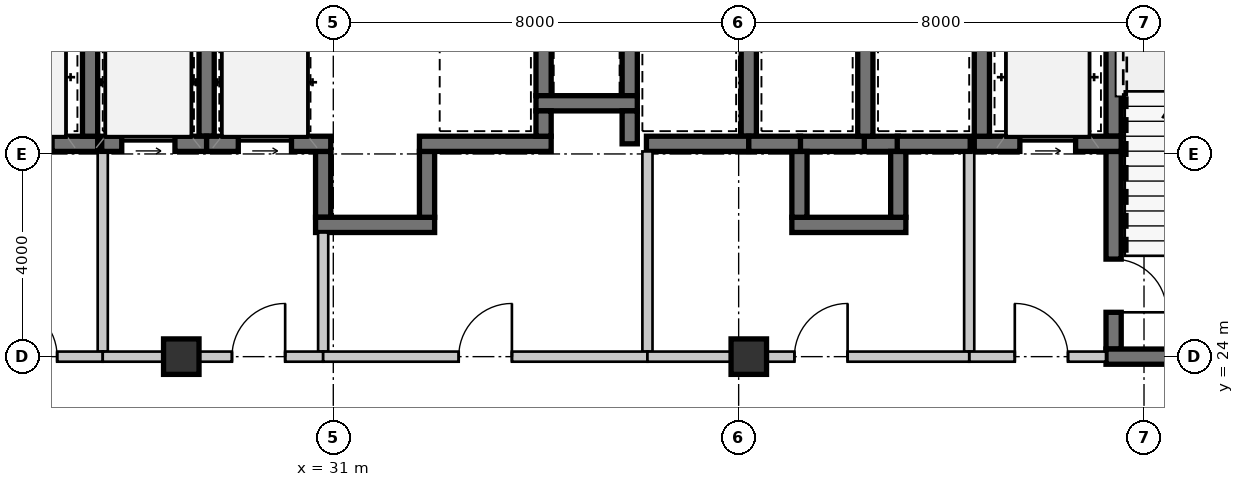
"""IFC4 building model, lengths in metres.
Left out: names, types, materials, properties, quantities, classifications, styles, units other than length and angle.
Written with IfcOpenShell. Run it as: python <this file> out.ifc"""

import sys

from ifc_helpers import new_model, si_unit, direction, frame, frame_2d, origin, origin_2d, place, context, subcontext, project, spatial, rectangle, extrude, source, transform, mapped, element, fill, save


model = new_model("IFC4")
c1 = context("Model", 3, precision=1e-05, world=origin(), true_north=direction((0.0, 1.0)))
c2 = subcontext(c1, "Body", "Model", "MODEL_VIEW")
j1 = project(units=[si_unit("LENGTHUNIT", "METRE"), si_unit("PLANEANGLEUNIT", "RADIAN")], contexts=[c1])
p1 = place(None, origin())
s1 = spatial("IfcSite", under=j1, at=p1, CompositionType="ELEMENT")
p2 = place(p1, origin())
s2 = spatial("IfcBuilding", under=s1, at=p2, CompositionType="ELEMENT")
p3 = place(p2, frame((0.0, 0.0, 106.05)))
s3 = spatial("IfcBuildingStorey", under=s2, at=p3, CompositionType="ELEMENT", Elevation=106.05)
m1 = source(origin(), c2, "Body", "SweptSolid", [
    extrude(rectangle(XDim=0.7, YDim=0.7, at=origin_2d()), origin(), (0.0, 0.0, 1.0), 3.15),
])
for number, where, z_axis, x_axis in (
    (1, (28.0, 24.0, 0.0), (0.0, 0.0, 1.0), (1.0, 0.0, 0.0)),
    (2, (39.2, 24.0, 0.0), (0.0, 0.0, 1.0), (1.0, 0.0, 0.0)),
):
    element("IfcColumn", number, at=place(p3, frame(where, z_axis=z_axis, x_axis=x_axis)), inside=s3, PredefinedType="COLUMN", context=c2, shape_type="MappedRepresentation", body=[
        mapped(m1, transform((0.0, 0.0, 0.0), scale=1.0)),
    ])
m2 = source(origin(), c2, "Body", "SweptSolid", [
    extrude(rectangle(XDim=2.9, YDim=0.3, at=frame_2d((1.45, 0.0))), origin(), (0.0, 0.0, 1.0), 2.93),
])
p4 = place(p3, frame((23.45, 28.2, 0.0), z_axis=(0.0, 0.0, 1.0), x_axis=(1.0, 0.0, 0.0)))
e3 = element("IfcWall", 3, at=p4, inside=s3, PredefinedType="SHEAR", context=c2, shape_type="MappedRepresentation", body=[
    mapped(m2, transform((0.0, 0.0, 0.0), scale=1.0)),
])
m3 = source(origin(), c2, "Body", "SweptSolid", [
    extrude(rectangle(XDim=1.1, YDim=2.15, at=frame_2d((0.55, 1.075))), frame((0.0, 0.16, 0.0), z_axis=(0.0, -1.0, 0.0), x_axis=(1.0, 0.0, 0.0)), (0.0, 0.0, 1.0), 0.32),
])
p5 = place(p4, frame((0.9, 0.0, 0.0)))
e4 = element("IfcOpeningElement", 4, at=p5, cuts=e3, PredefinedType="OPENING", context=c2, shape_type="MappedRepresentation", body=[
    mapped(m3, transform((0.0, 0.0, 0.0), scale=1.0)),
])
m4 = source(origin(), c2, "Body", "SweptSolid", [
    extrude(rectangle(XDim=3.5, YDim=0.3, at=frame_2d((1.75, 0.0))), origin(), (0.0, 0.0, 1.0), 2.93),
])
p6 = place(p3, frame((26.2, 28.35, 0.0), z_axis=(0.0, 0.0, 1.0), x_axis=(0.0, 1.0, 0.0)))
e5 = element("IfcWall", 5, at=p6, inside=s3, PredefinedType="SHEAR", context=c2, shape_type="MappedRepresentation", body=[
    mapped(m4, transform((0.0, 0.0, 0.0), scale=1.0)),
])
m5 = source(origin(), c2, "Body", "SweptSolid", [
    extrude(rectangle(XDim=3.95, YDim=0.2, at=frame_2d((1.975, 0.0))), origin(), (0.0, 0.0, 1.0), 2.93),
])
p7 = place(p3, frame((26.45, 24.1, 0.0), z_axis=(0.0, 0.0, 1.0), x_axis=(0.0, 1.0, 0.0)))
e6 = element("IfcWall", 6, at=p7, inside=s3, PredefinedType="SOLIDWALL", context=c2, shape_type="MappedRepresentation", body=[
    mapped(m5, transform((0.0, 0.0, 0.0), scale=1.0)),
])
m6 = source(origin(), c2, "Body", "SweptSolid", [
    extrude(rectangle(XDim=2.7, YDim=0.2, at=frame_2d((1.35, 0.0))), origin(), (0.0, 0.0, 1.0), 2.47),
])
p8 = place(p3, frame((23.75, 24.0, 0.0), z_axis=(0.0, 0.0, 1.0), x_axis=(1.0, 0.0, 0.0)))
e7 = element("IfcWall", 7, at=p8, inside=s3, PredefinedType="SOLIDWALL", context=c2, shape_type="MappedRepresentation", body=[
    mapped(m6, transform((0.0, 0.0, 0.0), scale=1.0)),
])
m7 = source(origin(), c2, "Body", "SweptSolid", [
    extrude(rectangle(XDim=1.05, YDim=2.1, at=frame_2d((0.525, 1.05))), frame((0.0, 0.11, 0.0), z_axis=(0.0, -1.0, 0.0), x_axis=(1.0, 0.0, 0.0)), (0.0, 0.0, 1.0), 0.22),
])
p9 = place(p8, frame((0.75, 0.0, 0.0)))
e8 = element("IfcOpeningElement", 8, at=p9, cuts=e7, PredefinedType="OPENING", context=c2, shape_type="MappedRepresentation", body=[
    mapped(m7, transform((0.0, 0.0, 0.0), scale=1.0)),
])
p10 = place(p3, frame((46.4, 31.85, 0.0), z_axis=(0.0, 0.0, 1.0), x_axis=(0.0, -1.0, 0.0)))
e9 = element("IfcWall", 9, at=p10, inside=s3, PredefinedType="SHEAR", context=c2, shape_type="MappedRepresentation", body=[
    mapped(m4, transform((0.0, 0.0, 0.0), scale=1.0)),
])
m8 = source(origin(), c2, "Body", "SweptSolid", [
    extrude(rectangle(XDim=3.9, YDim=0.3, at=frame_2d((1.95, 0.0))), origin(), (0.0, 0.0, 1.0), 2.93),
])
p11 = place(p3, frame((46.4, 28.05, 0.0), z_axis=(0.0, 0.0, 1.0), x_axis=(0.0, -1.0, 0.0)))
e10 = element("IfcWall", 10, at=p11, inside=s3, PredefinedType="SHEAR", context=c2, shape_type="MappedRepresentation", body=[
    mapped(m8, transform((0.0, 0.0, 0.0), scale=1.0)),
])
m9 = source(origin(), c2, "Body", "SweptSolid", [
    extrude(rectangle(XDim=1.05, YDim=2.1, at=frame_2d((0.525, 1.05))), frame((0.0, 0.16, 0.0), z_axis=(0.0, -1.0, 0.0), x_axis=(1.0, 0.0, 0.0)), (0.0, 0.0, 1.0), 0.32),
])
p12 = place(p11, frame((2.125, 0.0, 0.0)))
e11 = element("IfcOpeningElement", 11, at=p12, cuts=e10, PredefinedType="OPENING", context=c2, shape_type="MappedRepresentation", body=[
    mapped(m9, transform((0.0, 0.0, 0.0), scale=1.0)),
])
m10 = source(origin(), c2, "Body", "SweptSolid", [
    extrude(rectangle(XDim=4.9, YDim=0.3, at=frame_2d((2.45, 0.0))), origin(), (0.0, 0.0, 1.0), 2.93),
])
p13 = place(p3, frame((46.25, 24.0, 0.0), z_axis=(0.0, 0.0, 1.0), x_axis=(1.0, 0.0, 0.0)))
e12 = element("IfcWall", 12, at=p13, inside=s3, PredefinedType="SHEAR", context=c2, shape_type="MappedRepresentation", body=[
    mapped(m10, transform((0.0, 0.0, 0.0), scale=1.0)),
])
p14 = place(p3, frame((43.65, 28.2, 0.0), z_axis=(0.0, 0.0, 1.0), x_axis=(1.0, 0.0, 0.0)))
e13 = element("IfcWall", 13, at=p14, inside=s3, PredefinedType="SHEAR", context=c2, shape_type="MappedRepresentation", body=[
    mapped(m2, transform((0.0, 0.0, 0.0), scale=1.0)),
])
p15 = place(p14, frame((0.9, 0.0, 0.0)))
e14 = element("IfcOpeningElement", 14, at=p15, cuts=e13, PredefinedType="OPENING", context=c2, shape_type="MappedRepresentation", body=[
    mapped(m3, transform((0.0, 0.0, 0.0), scale=1.0)),
])
p16 = place(p3, frame((43.8, 31.85, 0.0), z_axis=(0.0, 0.0, 1.0), x_axis=(0.0, -1.0, 0.0)))
e15 = element("IfcWall", 15, at=p16, inside=s3, PredefinedType="SHEAR", context=c2, shape_type="MappedRepresentation", body=[
    mapped(m4, transform((0.0, 0.0, 0.0), scale=1.0)),
])
p17 = place(p3, frame((43.55, 28.05, 0.0), z_axis=(0.0, 0.0, 1.0), x_axis=(0.0, -1.0, 0.0)))
e16 = element("IfcWall", 16, at=p17, inside=s3, PredefinedType="SOLIDWALL", context=c2, shape_type="MappedRepresentation", body=[
    mapped(m5, transform((0.0, 0.0, 0.0), scale=1.0)),
])
m11 = source(origin(), c2, "Body", "SweptSolid", [
    extrude(rectangle(XDim=2.7, YDim=0.2, at=frame_2d((1.35, 0.0))), origin(), (0.0, 0.0, 1.0), 2.397),
])
p18 = place(p3, frame((43.55, 24.0, 0.0), z_axis=(0.0, 0.0, 1.0), x_axis=(1.0, 0.0, 0.0)))
e17 = element("IfcWall", 17, at=p18, inside=s3, PredefinedType="SOLIDWALL", context=c2, shape_type="MappedRepresentation", body=[
    mapped(m11, transform((0.0, 0.0, 0.0), scale=1.0)),
])
p19 = place(p18, frame((0.9, 0.0, 0.0)))
e18 = element("IfcOpeningElement", 18, at=p19, cuts=e17, PredefinedType="OPENING", context=c2, shape_type="MappedRepresentation", body=[
    mapped(m7, transform((0.0, 0.0, 0.0), scale=1.0)),
])
m12 = source(origin(), c2, "Body", "SweptSolid", [
    extrude(rectangle(XDim=1.2, YDim=0.3, at=frame_2d((0.6, 0.0))), origin(), (0.0, 0.0, 1.0), 2.93),
])
for number, where, z_axis, x_axis in (
    (19, (35.15, 30.35, 0.0), (0.0, 0.0, 1.0), (0.0, -1.0, 0.0)),
    (20, (36.85, 29.15, 0.0), (0.0, 0.0, 1.0), (0.0, 1.0, 0.0)),
):
    element("IfcWall", number, at=place(p3, frame(where, z_axis=z_axis, x_axis=x_axis)), inside=s3, PredefinedType="SHEAR", context=c2, shape_type="MappedRepresentation", body=[
        mapped(m12, transform((0.0, 0.0, 0.0), scale=1.0)),
    ])
m13 = source(origin(), c2, "Body", "SweptSolid", [
    extrude(rectangle(XDim=2.0, YDim=0.3, at=frame_2d((1.0, 0.0))), origin(), (0.0, 0.0, 1.0), 2.93),
])
p20 = place(p3, frame((35.0, 29.0, 0.0), z_axis=(0.0, 0.0, 1.0), x_axis=(1.0, 0.0, 0.0)))
e21 = element("IfcWall", 21, at=p20, inside=s3, PredefinedType="SHEAR", context=c2, shape_type="MappedRepresentation", body=[
    mapped(m13, transform((0.0, 0.0, 0.0), scale=1.0)),
])
m14 = source(origin(), c2, "Body", "SweptSolid", [
    extrude(rectangle(XDim=1.3, YDim=0.3, at=frame_2d((0.65, 0.0))), origin(), (0.0, 0.0, 1.0), 2.93),
])
p21 = place(p3, frame((30.8, 28.05, 0.0), z_axis=(0.0, 0.0, 1.0), x_axis=(0.0, -1.0, 0.0)))
e22 = element("IfcWall", 22, at=p21, inside=s3, PredefinedType="SHEAR", context=c2, shape_type="MappedRepresentation", body=[
    mapped(m14, transform((0.0, 0.0, 0.0), scale=1.0)),
])
m15 = source(origin(), c2, "Body", "SweptSolid", [
    extrude(rectangle(XDim=2.35, YDim=0.3, at=frame_2d((1.175, 0.0))), origin(), (0.0, 0.0, 1.0), 2.93),
])
p22 = place(p3, frame((30.65, 26.6, 0.0), z_axis=(0.0, 0.0, 1.0), x_axis=(1.0, 0.0, 0.0)))
e23 = element("IfcWall", 23, at=p22, inside=s3, PredefinedType="SHEAR", context=c2, shape_type="MappedRepresentation", body=[
    mapped(m15, transform((0.0, 0.0, 0.0), scale=1.0)),
])
p23 = place(p3, frame((32.85, 26.75, 0.0), z_axis=(0.0, 0.0, 1.0), x_axis=(0.0, 1.0, 0.0)))
e24 = element("IfcWall", 24, at=p23, inside=s3, PredefinedType="SHEAR", context=c2, shape_type="MappedRepresentation", body=[
    mapped(m14, transform((0.0, 0.0, 0.0), scale=1.0)),
])
m16 = source(origin(), c2, "Body", "SweptSolid", [
    extrude(rectangle(XDim=1.32, YDim=0.3, at=frame_2d((0.66, 0.0))), origin(), (0.0, 0.0, 1.0), 2.93),
])
p24 = place(p3, frame((41.52, 28.2, 0.0), z_axis=(0.0, 0.0, 1.0), x_axis=(-1.0, 0.0, 0.0)))
e25 = element("IfcWall", 25, at=p24, inside=s3, PredefinedType="SHEAR", context=c2, shape_type="MappedRepresentation", body=[
    mapped(m16, transform((0.0, 0.0, 0.0), scale=1.0)),
])
m17 = source(origin(), c2, "Body", "SweptSolid", [
    extrude(rectangle(XDim=0.67, YDim=0.3, at=frame_2d((0.335, 0.0))), origin(), (0.0, 0.0, 1.0), 2.93),
])
p25 = place(p3, frame((42.15, 28.2, 0.0), z_axis=(0.0, 0.0, 1.0), x_axis=(-1.0, 0.0, 0.0)))
e26 = element("IfcWall", 26, at=p25, inside=s3, PredefinedType="SHEAR", context=c2, shape_type="MappedRepresentation", body=[
    mapped(m17, transform((0.0, 0.0, 0.0), scale=1.0)),
])
m18 = source(origin(), c2, "Body", "SweptSolid", [
    extrude(rectangle(XDim=2.25, YDim=0.3, at=frame_2d((1.125, 0.0))), origin(), (0.0, 0.0, 1.0), 2.93),
])
p26 = place(p3, frame((40.05, 26.6, 0.0), z_axis=(0.0, 0.0, 1.0), x_axis=(1.0, 0.0, 0.0)))
e27 = element("IfcWall", 27, at=p26, inside=s3, PredefinedType="SHEAR", context=c2, shape_type="MappedRepresentation", body=[
    mapped(m18, transform((0.0, 0.0, 0.0), scale=1.0)),
])
for number, where, z_axis, x_axis in (
    (28, (40.2, 28.05, 0.0), (0.0, 0.0, 1.0), (0.0, -1.0, 0.0)),
    (29, (42.15, 26.75, 0.0), (0.0, 0.0, 1.0), (0.0, 1.0, 0.0)),
):
    element("IfcWall", number, at=place(p3, frame(where, z_axis=z_axis, x_axis=x_axis)), inside=s3, PredefinedType="SHEAR", context=c2, shape_type="MappedRepresentation", body=[
        mapped(m14, transform((0.0, 0.0, 0.0), scale=1.0)),
    ])
p27 = place(p3, frame((28.5, 28.35, 0.0), z_axis=(0.0, 0.0, 1.0), x_axis=(0.0, 1.0, 0.0)))
e30 = element("IfcWall", 30, at=p27, inside=s3, PredefinedType="SHEAR", context=c2, shape_type="MappedRepresentation", body=[
    mapped(m4, transform((0.0, 0.0, 0.0), scale=1.0)),
])
m19 = source(origin(), c2, "Body", "SweptSolid", [
    extrude(rectangle(XDim=2.07, YDim=0.3, at=frame_2d((1.035, 0.0))), origin(), (0.0, 0.0, 1.0), 2.93),
])
p28 = place(p3, frame((26.43, 28.2, 0.0), z_axis=(0.0, 0.0, 1.0), x_axis=(1.0, 0.0, 0.0)))
e31 = element("IfcWall", 31, at=p28, inside=s3, PredefinedType="SHEAR", context=c2, shape_type="MappedRepresentation", body=[
    mapped(m19, transform((0.0, 0.0, 0.0), scale=1.0)),
])
m20 = source(origin(), c2, "Body", "SweptSolid", [
    extrude(rectangle(XDim=1.05, YDim=2.15, at=frame_2d((0.525, 1.075))), frame((0.0, 0.16, 0.0), z_axis=(0.0, -1.0, 0.0), x_axis=(1.0, 0.0, 0.0)), (0.0, 0.0, 1.0), 0.32),
])
p29 = place(p28, frame((0.395, 0.0, 0.0)))
e32 = element("IfcOpeningElement", 32, at=p29, cuts=e31, PredefinedType="OPENING", context=c2, shape_type="MappedRepresentation", body=[
    mapped(m20, transform((0.0, 0.0, 0.0), scale=1.0)),
])
m21 = source(origin(), c2, "Body", "SweptSolid", [
    extrude(rectangle(XDim=2.45, YDim=0.3, at=frame_2d((1.225, 0.0))), origin(), (0.0, 0.0, 1.0), 2.93),
])
p30 = place(p3, frame((28.5, 28.2, 0.0), z_axis=(0.0, 0.0, 1.0), x_axis=(1.0, 0.0, 0.0)))
e33 = element("IfcWall", 33, at=p30, inside=s3, PredefinedType="SHEAR", context=c2, shape_type="MappedRepresentation", body=[
    mapped(m21, transform((0.0, 0.0, 0.0), scale=1.0)),
])
p31 = place(p30, frame((0.625, 0.0, 0.0)))
e34 = element("IfcOpeningElement", 34, at=p31, cuts=e33, PredefinedType="OPENING", context=c2, shape_type="MappedRepresentation", body=[
    mapped(m20, transform((0.0, 0.0, 0.0), scale=1.0)),
])
m22 = source(origin(), c2, "Body", "SweptSolid", [
    extrude(rectangle(XDim=2.35, YDim=0.2, at=frame_2d((1.175, 0.0))), origin(), (0.0, 0.0, 1.0), 2.93),
])
p32 = place(p3, frame((30.8, 26.45, 0.0), z_axis=(0.0, 0.0, 1.0), x_axis=(0.0, -1.0, 0.0)))
e35 = element("IfcWall", 35, at=p32, inside=s3, PredefinedType="SOLIDWALL", context=c2, shape_type="MappedRepresentation", body=[
    mapped(m22, transform((0.0, 0.0, 0.0), scale=1.0)),
])
m23 = source(origin(), c2, "Body", "SweptSolid", [
    extrude(rectangle(XDim=4.35, YDim=0.2, at=frame_2d((2.175, 0.0))), origin(), (0.0, 0.0, 1.0), 2.47),
])
p33 = place(p3, frame((30.8, 24.0, 0.0), z_axis=(0.0, 0.0, 1.0), x_axis=(-1.0, 0.0, 0.0)))
e36 = element("IfcWall", 36, at=p33, inside=s3, PredefinedType="SOLIDWALL", context=c2, shape_type="MappedRepresentation", body=[
    mapped(m23, transform((0.0, 0.0, 0.0), scale=1.0)),
])
p34 = place(p33, frame((0.75, 0.0, 0.0)))
e37 = element("IfcOpeningElement", 37, at=p34, cuts=e36, PredefinedType="OPENING", context=c2, shape_type="MappedRepresentation", body=[
    mapped(m7, transform((0.0, 0.0, 0.0), scale=1.0)),
])
m24 = source(origin(), c2, "Body", "SweptSolid", [
    extrude(rectangle(XDim=2.6, YDim=0.3, at=frame_2d((1.3, 0.0))), origin(), (0.0, 0.0, 1.0), 2.93),
])
p35 = place(p3, frame((32.7, 28.2, 0.0), z_axis=(0.0, 0.0, 1.0), x_axis=(1.0, 0.0, 0.0)))
e38 = element("IfcWall", 38, at=p35, inside=s3, PredefinedType="SHEAR", context=c2, shape_type="MappedRepresentation", body=[
    mapped(m24, transform((0.0, 0.0, 0.0), scale=1.0)),
])
m25 = source(origin(), c2, "Body", "SweptSolid", [
    extrude(rectangle(XDim=0.5, YDim=0.3, at=frame_2d((0.25, 0.0))), origin(), (0.0, 0.0, 1.0), 2.93),
])
p36 = place(p3, frame((35.15, 28.35, 0.0), z_axis=(0.0, 0.0, 1.0), x_axis=(0.0, 1.0, 0.0)))
e39 = element("IfcWall", 39, at=p36, inside=s3, PredefinedType="SHEAR", context=c2, shape_type="MappedRepresentation", body=[
    mapped(m25, transform((0.0, 0.0, 0.0), scale=1.0)),
])
p37 = place(p3, frame((39.2, 28.35, 0.0), z_axis=(0.0, 0.0, 1.0), x_axis=(0.0, 1.0, 0.0)))
e40 = element("IfcWall", 40, at=p37, inside=s3, PredefinedType="SHEAR", context=c2, shape_type="MappedRepresentation", body=[
    mapped(m4, transform((0.0, 0.0, 0.0), scale=1.0)),
])
m26 = source(origin(), c2, "Body", "SweptSolid", [
    extrude(rectangle(XDim=0.65, YDim=0.3, at=frame_2d((0.325, 0.0))), origin(), (0.0, 0.0, 1.0), 2.93),
])
p38 = place(p3, frame((36.85, 28.85, 0.0), z_axis=(0.0, 0.0, 1.0), x_axis=(0.0, -1.0, 0.0)))
e41 = element("IfcWall", 41, at=p38, inside=s3, PredefinedType="SHEAR", context=c2, shape_type="MappedRepresentation", body=[
    mapped(m26, transform((0.0, 0.0, 0.0), scale=1.0)),
])
m27 = source(origin(), c2, "Body", "SweptSolid", [
    extrude(rectangle(XDim=2.02, YDim=0.3, at=frame_2d((1.01, 0.0))), origin(), (0.0, 0.0, 1.0), 2.93),
])
p39 = place(p3, frame((37.18, 28.2, 0.0), z_axis=(0.0, 0.0, 1.0), x_axis=(1.0, 0.0, 0.0)))
e42 = element("IfcWall", 42, at=p39, inside=s3, PredefinedType="SHEAR", context=c2, shape_type="MappedRepresentation", body=[
    mapped(m27, transform((0.0, 0.0, 0.0), scale=1.0)),
])
p40 = place(p3, frame((41.5, 28.35, 0.0), z_axis=(0.0, 0.0, 1.0), x_axis=(0.0, 1.0, 0.0)))
e43 = element("IfcWall", 43, at=p40, inside=s3, PredefinedType="SHEAR", context=c2, shape_type="MappedRepresentation", body=[
    mapped(m4, transform((0.0, 0.0, 0.0), scale=1.0)),
])
m28 = source(origin(), c2, "Body", "SweptSolid", [
    extrude(rectangle(XDim=1.02, YDim=0.3, at=frame_2d((0.51, 0.0))), origin(), (0.0, 0.0, 1.0), 2.93),
])
p41 = place(p3, frame((39.2, 28.2, 0.0), z_axis=(0.0, 0.0, 1.0), x_axis=(1.0, 0.0, 0.0)))
e44 = element("IfcWall", 44, at=p41, inside=s3, PredefinedType="SHEAR", context=c2, shape_type="MappedRepresentation", body=[
    mapped(m28, transform((0.0, 0.0, 0.0), scale=1.0)),
])
m29 = source(origin(), c2, "Body", "SweptSolid", [
    extrude(rectangle(XDim=1.44, YDim=0.3, at=frame_2d((0.72, 0.0))), origin(), (0.0, 0.0, 1.0), 2.93),
])
p42 = place(p3, frame((42.13, 28.2, 0.0), z_axis=(0.0, 0.0, 1.0), x_axis=(1.0, 0.0, 0.0)))
e45 = element("IfcWall", 45, at=p42, inside=s3, PredefinedType="SHEAR", context=c2, shape_type="MappedRepresentation", body=[
    mapped(m29, transform((0.0, 0.0, 0.0), scale=1.0)),
])
p43 = place(p3, frame((37.2, 28.05, 0.0), z_axis=(0.0, 0.0, 1.0), x_axis=(0.0, -1.0, 0.0)))
e46 = element("IfcWall", 46, at=p43, inside=s3, PredefinedType="SOLIDWALL", context=c2, shape_type="MappedRepresentation", body=[
    mapped(m5, transform((0.0, 0.0, 0.0), scale=1.0)),
])
m30 = source(origin(), c2, "Body", "SweptSolid", [
    extrude(rectangle(XDim=6.4, YDim=0.2, at=frame_2d((3.2, 0.0))), origin(), (0.0, 0.0, 1.0), 2.47),
])
p44 = place(p3, frame((37.2, 24.0, 0.0), z_axis=(0.0, 0.0, 1.0), x_axis=(-1.0, 0.0, 0.0)))
e47 = element("IfcWall", 47, at=p44, inside=s3, PredefinedType="SOLIDWALL", context=c2, shape_type="MappedRepresentation", body=[
    mapped(m30, transform((0.0, 0.0, 0.0), scale=1.0)),
])
p45 = place(p44, frame((2.675, 0.0, 0.0)))
e48 = element("IfcOpeningElement", 48, at=p45, cuts=e47, PredefinedType="OPENING", context=c2, shape_type="MappedRepresentation", body=[
    mapped(m7, transform((0.0, 0.0, 0.0), scale=1.0)),
])
m31 = source(origin(), c2, "Body", "SweptSolid", [
    extrude(rectangle(XDim=4.35, YDim=0.2, at=frame_2d((2.175, 0.0))), origin(), (0.0, 0.0, 1.0), 2.397),
])
p46 = place(p3, frame((43.55, 24.0, 0.0), z_axis=(0.0, 0.0, 1.0), x_axis=(-1.0, 0.0, 0.0)))
e49 = element("IfcWall", 49, at=p46, inside=s3, PredefinedType="SOLIDWALL", context=c2, shape_type="MappedRepresentation", body=[
    mapped(m31, transform((0.0, 0.0, 0.0), scale=1.0)),
])
p47 = place(p46, frame((2.4, 0.0, 0.0)))
e50 = element("IfcOpeningElement", 50, at=p47, cuts=e49, PredefinedType="OPENING", context=c2, shape_type="MappedRepresentation", body=[
    mapped(m7, transform((0.0, 0.0, 0.0), scale=1.0)),
])
m32 = source(origin(), c2, "Body", "SweptSolid", [
    extrude(rectangle(XDim=2.0, YDim=0.2, at=frame_2d((1.0, 0.0))), origin(), (0.0, 0.0, 1.0), 2.47),
])
p48 = place(p3, frame((39.2, 24.0, 0.0), z_axis=(0.0, 0.0, 1.0), x_axis=(-1.0, 0.0, 0.0)))
e51 = element("IfcWall", 51, at=p48, inside=s3, PredefinedType="SOLIDWALL", context=c2, shape_type="MappedRepresentation", body=[
    mapped(m32, transform((0.0, 0.0, 0.0), scale=1.0)),
])
m33 = source(origin(), c2, "Body", "SweptSolid", [
    extrude(rectangle(XDim=1.05, YDim=2.1, at=frame_2d((0.525, 1.05))), frame((0.0, 0.025, 0.0), z_axis=(0.0, -1.0, 0.0), x_axis=(1.0, 0.0, 0.0)), (0.0, 0.0, 1.0), 0.05),
])
p49 = place(p9, origin())
e52 = element("IfcDoor", 52, at=p49, inside=s3, OperationType="SINGLE_SWING_LEFT", PredefinedType="DOOR", context=c2, shape_type="MappedRepresentation", body=[
    mapped(m33, transform((0.0, 0.0, 0.0), scale=1.0)),
])
fill(e8, e52)
p50 = place(p12, origin())
e53 = element("IfcDoor", 53, at=p50, inside=s3, OperationType="SINGLE_SWING_RIGHT", PredefinedType="DOOR", context=c2, shape_type="MappedRepresentation", body=[
    mapped(m33, transform((0.0, 0.0, 0.0), scale=1.0)),
])
fill(e11, e53)
m34 = source(origin(), c2, "Body", "SweptSolid", [
    extrude(rectangle(XDim=1.1, YDim=2.15, at=frame_2d((0.55, 1.075))), frame((0.0, 0.025, 0.0), z_axis=(0.0, -1.0, 0.0), x_axis=(1.0, 0.0, 0.0)), (0.0, 0.0, 1.0), 0.05),
])
p51 = place(p15, origin())
e54 = element("IfcDoor", 54, at=p51, inside=s3, OperationType="SLIDING_TO_LEFT", PredefinedType="DOOR", context=c2, shape_type="MappedRepresentation", body=[
    mapped(m34, transform((0.0, 0.0, 0.0), scale=1.0)),
])
fill(e14, e54)
p52 = place(p19, origin())
e55 = element("IfcDoor", 55, at=p52, inside=s3, OperationType="SINGLE_SWING_LEFT", PredefinedType="DOOR", context=c2, shape_type="MappedRepresentation", body=[
    mapped(m33, transform((0.0, 0.0, 0.0), scale=1.0)),
])
fill(e18, e55)
m35 = source(origin(), c2, "Body", "SweptSolid", [
    extrude(rectangle(XDim=1.05, YDim=2.15, at=frame_2d((0.525, 1.075))), frame((0.0, 0.025, 0.0), z_axis=(0.0, -1.0, 0.0), x_axis=(1.0, 0.0, 0.0)), (0.0, 0.0, 1.0), 0.05),
])
p53 = place(p29, origin())
e56 = element("IfcDoor", 56, at=p53, inside=s3, OperationType="SLIDING_TO_LEFT", PredefinedType="DOOR", context=c2, shape_type="MappedRepresentation", body=[
    mapped(m35, transform((0.0, 0.0, 0.0), scale=1.0)),
])
fill(e32, e56)
p54 = place(p31, origin())
e57 = element("IfcDoor", 57, at=p54, inside=s3, OperationType="SLIDING_TO_LEFT", PredefinedType="DOOR", context=c2, shape_type="MappedRepresentation", body=[
    mapped(m35, transform((0.0, 0.0, 0.0), scale=1.0)),
])
fill(e34, e57)
p55 = place(p34, frame((1.05, 0.0, 0.0), z_axis=(0.0, 0.0, 1.0), x_axis=(-1.0, 0.0, 0.0)))
e58 = element("IfcDoor", 58, at=p55, inside=s3, OperationType="SINGLE_SWING_RIGHT", PredefinedType="DOOR", context=c2, shape_type="MappedRepresentation", body=[
    mapped(m33, transform((0.0, 0.0, 0.0), scale=1.0)),
])
fill(e37, e58)
p56 = place(p45, frame((1.05, 0.0, 0.0), z_axis=(0.0, 0.0, 1.0), x_axis=(-1.0, 0.0, 0.0)))
e59 = element("IfcDoor", 59, at=p56, inside=s3, OperationType="SINGLE_SWING_RIGHT", PredefinedType="DOOR", context=c2, shape_type="MappedRepresentation", body=[
    mapped(m33, transform((0.0, 0.0, 0.0), scale=1.0)),
])
fill(e48, e59)
p57 = place(p47, frame((1.05, 0.0, 0.0), z_axis=(0.0, 0.0, 1.0), x_axis=(-1.0, 0.0, 0.0)))
e60 = element("IfcDoor", 60, at=p57, inside=s3, OperationType="SINGLE_SWING_RIGHT", PredefinedType="DOOR", context=c2, shape_type="MappedRepresentation", body=[
    mapped(m33, transform((0.0, 0.0, 0.0), scale=1.0)),
])
fill(e50, e60)
save(model, sys.argv[1])
